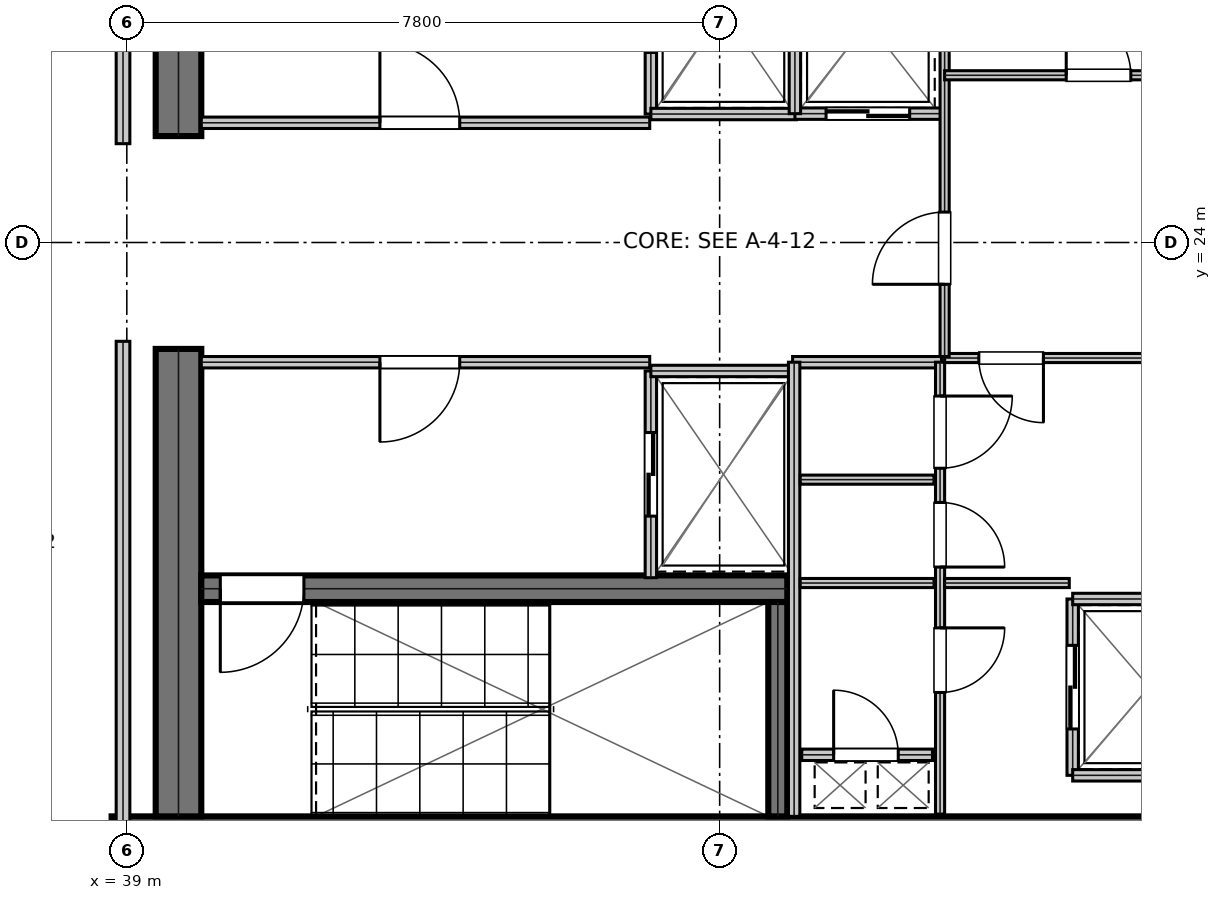
"""IFC4 building model, lengths in metres.
Left out: names, types, materials, properties, quantities, classifications, styles, units other than length and angle.
Written with IfcOpenShell. Run it as: python <this file> out.ifc"""

import sys

from ifc_helpers import new_model, si_unit, direction, frame, frame_2d, origin, place, context, subcontext, project, spatial, rectangle, extrude, element, fill, save


model = new_model("IFC4")
c1 = context("Model", 3, precision=1e-05, world=origin(), true_north=direction((0.0, 1.0)))
c2 = subcontext(c1, "Body", "Model", "MODEL_VIEW")
j1 = project(units=[si_unit("LENGTHUNIT", "METRE"), si_unit("PLANEANGLEUNIT", "RADIAN")], contexts=[c1])
p1 = place(None, origin())
s1 = spatial("IfcSite", under=j1, at=p1, CompositionType="ELEMENT")
p2 = place(p1, origin())
s2 = spatial("IfcBuilding", under=s1, at=p2, CompositionType="ELEMENT")
p3 = place(p2, frame((0.0, 0.0, 291.15)))
s3 = spatial("IfcBuildingStorey", under=s2, at=p3, CompositionType="ELEMENT", Elevation=291.15)
p4 = place(p3, frame((38.8, 16.15, 0.0), z_axis=(0.0, 0.0, 1.0), x_axis=(1.0, 0.0, 0.0)))
e1 = element("IfcWall", 1, at=p4, inside=s3, PredefinedType="SHEAR", context=c2, shape_type="SweptSolid", body=[
    extrude(rectangle(XDim=16.0, YDim=0.6, at=frame_2d((8.0, 0.0))), origin(), (0.0, 0.0, 1.0), 3.81),
])
for number, where, z_axis, x_axis in (
    (2, (39.68, 16.45, 0.0), (0.0, 0.0, 1.0), (0.0, 1.0, 0.0)),
    (3, (39.68, 25.4, 0.0), (0.0, 0.0, 1.0), (0.0, 1.0, 0.0)),
):
    element("IfcWall", number, at=place(p3, frame(where, z_axis=z_axis, x_axis=x_axis)), inside=s3, PredefinedType="SHEAR", context=c2, shape_type="SweptSolid", body=[
        extrude(rectangle(XDim=6.15, YDim=0.6, at=frame_2d((3.075, 0.0))), origin(), (0.0, 0.0, 1.0), 3.81),
    ])
p5 = place(p3, frame((39.98, 19.445, 0.0), z_axis=(0.0, 0.0, 1.0), x_axis=(1.0, 0.0, 0.0)))
e4 = element("IfcWall", 4, at=p5, inside=s3, PredefinedType="SHEAR", context=c2, shape_type="SweptSolid", body=[
    extrude(rectangle(XDim=7.71, YDim=0.35, at=frame_2d((3.855, 0.0))), origin(), (0.0, 0.0, 1.0), 3.81),
])
p6 = place(p5, frame((0.25, 0.0, 0.0)))
e5 = element("IfcOpeningElement", 5, at=p6, cuts=e4, PredefinedType="OPENING", context=c2, shape_type="SweptSolid", body=[
    extrude(rectangle(XDim=1.1, YDim=2.15, at=frame_2d((0.55, 1.075))), frame((0.0, 0.185, 0.0), z_axis=(0.0, -1.0, 0.0), x_axis=(1.0, 0.0, 0.0)), (0.0, 0.0, 1.0), 0.37),
])
p7 = place(p3, frame((47.565, 16.45, 0.0), z_axis=(0.0, 0.0, 1.0), x_axis=(0.0, 1.0, 0.0)))
e6 = element("IfcWall", 6, at=p7, inside=s3, PredefinedType="SHEAR", context=c2, shape_type="SweptSolid", body=[
    extrude(rectangle(XDim=2.82, YDim=0.25, at=frame_2d((1.41, 0.0))), origin(), (0.0, 0.0, 1.0), 3.81),
])
p8 = place(p3, frame((39.98, 25.575, 0.0), z_axis=(0.0, 0.0, 1.0), x_axis=(1.0, 0.0, 0.0)))
e7 = element("IfcWall", 7, at=p8, inside=s3, PredefinedType="PARTITIONING", context=c2, shape_type="SweptSolid", body=[
    extrude(rectangle(XDim=5.9, YDim=0.15, at=frame_2d((2.95, 0.0))), origin(), (0.0, 0.0, 1.0), 3.81),
])
p9 = place(p8, frame((2.35, 0.0, 0.0)))
e8 = element("IfcOpeningElement", 8, at=p9, cuts=e7, PredefinedType="OPENING", context=c2, shape_type="SweptSolid", body=[
    extrude(rectangle(XDim=1.05, YDim=2.15, at=frame_2d((0.525, 1.075))), frame((0.0, 0.085, 0.0), z_axis=(0.0, -1.0, 0.0), x_axis=(1.0, 0.0, 0.0)), (0.0, 0.0, 1.0), 0.17),
])
p10 = place(p3, frame((39.98, 22.425, 0.0), z_axis=(0.0, 0.0, 1.0), x_axis=(1.0, 0.0, 0.0)))
e9 = element("IfcWall", 9, at=p10, inside=s3, PredefinedType="PARTITIONING", context=c2, shape_type="SweptSolid", body=[
    extrude(rectangle(XDim=5.9, YDim=0.15, at=frame_2d((2.95, 0.0))), origin(), (0.0, 0.0, 1.0), 3.81),
])
p11 = place(p10, frame((2.35, 0.0, 0.0)))
e10 = element("IfcOpeningElement", 10, at=p11, cuts=e9, PredefinedType="OPENING", context=c2, shape_type="SweptSolid", body=[
    extrude(rectangle(XDim=1.05, YDim=2.15, at=frame_2d((0.525, 1.075))), frame((0.0, 0.085, 0.0), z_axis=(0.0, -1.0, 0.0), x_axis=(1.0, 0.0, 0.0)), (0.0, 0.0, 1.0), 0.17),
])
p12 = place(p3, frame((45.895, 25.69, 0.0), z_axis=(0.0, 0.0, 1.0), x_axis=(0.0, 1.0, 0.0)))
e11 = element("IfcWall", 11, at=p12, inside=s3, PredefinedType="PARTITIONING", context=c2, shape_type="SweptSolid", body=[
    extrude(rectangle(XDim=2.72, YDim=0.15, at=frame_2d((1.36, 0.0))), origin(), (0.0, 0.0, 1.0), 3.81),
])
p13 = place(p12, frame((0.81, 0.0, 0.0)))
e12 = element("IfcOpeningElement", 12, at=p13, cuts=e11, PredefinedType="OPENING", context=c2, shape_type="SweptSolid", body=[
    extrude(rectangle(XDim=1.1, YDim=2.15, at=frame_2d((0.55, 1.075))), frame((0.0, 0.085, 0.0), z_axis=(0.0, -1.0, 0.0), x_axis=(1.0, 0.0, 0.0)), (0.0, 0.0, 1.0), 0.17),
])
p14 = place(p3, frame((45.895, 25.69, 0.0), z_axis=(0.0, 0.0, 1.0), x_axis=(1.0, 0.0, 0.0)))
e13 = element("IfcWall", 13, at=p14, inside=s3, PredefinedType="PARTITIONING", context=c2, shape_type="SweptSolid", body=[
    extrude(rectangle(XDim=1.915, YDim=0.15, at=frame_2d((0.958, 0.0))), origin(), (0.0, 0.0, 1.0), 3.81),
])
p15 = place(p3, frame((45.895, 19.59, 0.0), z_axis=(0.0, 0.0, 1.0), x_axis=(0.0, 1.0, 0.0)))
e14 = element("IfcWall", 14, at=p15, inside=s3, PredefinedType="PARTITIONING", context=c2, shape_type="SweptSolid", body=[
    extrude(rectangle(XDim=2.72, YDim=0.15, at=frame_2d((1.36, 0.0))), origin(), (0.0, 0.0, 1.0), 3.81),
])
p16 = place(p15, frame((0.81, 0.0, 0.0)))
e15 = element("IfcOpeningElement", 15, at=p16, cuts=e14, PredefinedType="OPENING", context=c2, shape_type="SweptSolid", body=[
    extrude(rectangle(XDim=1.1, YDim=2.15, at=frame_2d((0.55, 1.075))), frame((0.0, 0.085, 0.0), z_axis=(0.0, -1.0, 0.0), x_axis=(1.0, 0.0, 0.0)), (0.0, 0.0, 1.0), 0.17),
])
p17 = place(p3, frame((45.895, 22.31, 0.0), z_axis=(0.0, 0.0, 1.0), x_axis=(1.0, 0.0, 0.0)))
e16 = element("IfcWall", 16, at=p17, inside=s3, PredefinedType="PARTITIONING", context=c2, shape_type="SweptSolid", body=[
    extrude(rectangle(XDim=1.915, YDim=0.15, at=frame_2d((0.958, 0.0))), origin(), (0.0, 0.0, 1.0), 3.81),
])
p18 = place(p3, frame((47.79, 25.695, 0.0), z_axis=(0.0, 0.0, 1.0), x_axis=(1.0, 0.0, 0.0)))
e17 = element("IfcWall", 17, at=p18, inside=s3, PredefinedType="PARTITIONING", context=c2, shape_type="SweptSolid", body=[
    extrude(rectangle(XDim=1.92, YDim=0.15, at=frame_2d((0.96, 0.0))), origin(), (0.0, 0.0, 1.0), 3.81),
])
p19 = place(p18, frame((0.41, 0.0, 0.0)))
e18 = element("IfcOpeningElement", 18, at=p19, cuts=e17, PredefinedType="OPENING", context=c2, shape_type="SweptSolid", body=[
    extrude(rectangle(XDim=1.1, YDim=2.15, at=frame_2d((0.55, 1.075))), frame((0.0, 0.085, 0.0), z_axis=(0.0, -1.0, 0.0), x_axis=(1.0, 0.0, 0.0)), (0.0, 0.0, 1.0), 0.17),
])
p20 = place(p3, frame((47.79, 25.695, 0.0), z_axis=(0.0, 0.0, 1.0), x_axis=(0.0, 1.0, 0.0)))
e19 = element("IfcWall", 19, at=p20, inside=s3, PredefinedType="PARTITIONING", context=c2, shape_type="SweptSolid", body=[
    extrude(rectangle(XDim=2.415, YDim=0.15, at=frame_2d((1.208, 0.0))), origin(), (0.0, 0.0, 1.0), 3.81),
])
p21 = place(p3, frame((51.445, 16.99, 0.0), z_axis=(0.0, 0.0, 1.0), x_axis=(0.0, 1.0, 0.0)))
e20 = element("IfcWall", 20, at=p21, inside=s3, PredefinedType="PARTITIONING", context=c2, shape_type="SweptSolid", body=[
    extrude(rectangle(XDim=2.32, YDim=0.15, at=frame_2d((1.16, 0.0))), origin(), (0.0, 0.0, 1.0), 3.81),
])
p22 = place(p21, frame((0.61, 0.0, 0.0)))
e21 = element("IfcOpeningElement", 21, at=p22, cuts=e20, PredefinedType="OPENING", context=c2, shape_type="SweptSolid", body=[
    extrude(rectangle(XDim=1.1, YDim=2.15, at=frame_2d((0.55, 1.075))), frame((0.0, 0.085, 0.0), z_axis=(0.0, -1.0, 0.0), x_axis=(1.0, 0.0, 0.0)), (0.0, 0.0, 1.0), 0.17),
])
for number, where, z_axis, x_axis in (
    (22, (51.445, 16.99, 0.0), (0.0, 0.0, 1.0), (1.0, 0.0, 0.0)),
    (23, (51.445, 19.31, 0.0), (0.0, 0.0, 1.0), (1.0, 0.0, 0.0)),
):
    element("IfcWall", number, at=place(p3, frame(where, z_axis=z_axis, x_axis=x_axis)), inside=s3, PredefinedType="PARTITIONING", context=c2, shape_type="SweptSolid", body=[
        extrude(rectangle(XDim=2.015, YDim=0.15, at=frame_2d((1.007, 0.0))), origin(), (0.0, 0.0, 1.0), 3.81),
    ])
p23 = place(p3, frame((47.88, 17.26, 0.0), z_axis=(0.0, 0.0, 1.0), x_axis=(1.0, 0.0, 0.0)))
e24 = element("IfcWall", 24, at=p23, inside=s3, PredefinedType="PARTITIONING", context=c2, shape_type="SweptSolid", body=[
    extrude(rectangle(XDim=1.72, YDim=0.15, at=frame_2d((0.86, 0.0))), origin(), (0.0, 0.0, 1.0), 3.81),
])
p24 = place(p23, frame((0.42, 0.0, 0.0)))
e25 = element("IfcOpeningElement", 25, at=p24, cuts=e24, PredefinedType="OPENING", context=c2, shape_type="SweptSolid", body=[
    extrude(rectangle(XDim=0.85, YDim=2.15, at=frame_2d((0.425, 1.075))), frame((0.0, 0.085, 0.0), z_axis=(0.0, -1.0, 0.0), x_axis=(1.0, 0.0, 0.0)), (0.0, 0.0, 1.0), 0.17),
])
p25 = place(p3, frame((47.76, 22.425, 0.0), z_axis=(0.0, 0.0, 1.0), x_axis=(1.0, 0.0, 0.0)))
e26 = element("IfcWall", 26, at=p25, inside=s3, PredefinedType="PARTITIONING", context=c2, shape_type="SweptSolid", body=[
    extrude(rectangle(XDim=1.96, YDim=0.15, at=frame_2d((0.98, 0.0))), origin(), (0.0, 0.0, 1.0), 3.81),
])
p26 = place(p3, frame((47.78, 16.45, 0.0), z_axis=(0.0, 0.0, 1.0), x_axis=(0.0, 1.0, 0.0)))
e27 = element("IfcWall", 27, at=p26, inside=s3, PredefinedType="PARTITIONING", context=c2, shape_type="SweptSolid", body=[
    extrude(rectangle(XDim=5.975, YDim=0.15, at=frame_2d((2.988, 0.0))), origin(), (0.0, 0.0, 1.0), 3.81),
])
for number, where, z_axis, x_axis in (
    (28, (47.86, 19.52, 0.0), (0.0, 0.0, 1.0), (1.0, 0.0, 0.0)),
    (29, (47.86, 20.88, 0.0), (0.0, 0.0, 1.0), (1.0, 0.0, 0.0)),
):
    element("IfcWall", number, at=place(p3, frame(where, z_axis=z_axis, x_axis=x_axis)), inside=s3, PredefinedType="PARTITIONING", context=c2, shape_type="SweptSolid", body=[
        extrude(rectangle(XDim=1.76, YDim=0.12, at=frame_2d((0.88, 0.0))), origin(), (0.0, 0.0, 1.0), 3.81),
    ])
p27 = place(p3, frame((49.7, 16.48, 0.0), z_axis=(0.0, 0.0, 1.0), x_axis=(0.0, 1.0, 0.0)))
e30 = element("IfcWall", 30, at=p27, inside=s3, PredefinedType="PARTITIONING", context=c2, shape_type="SweptSolid", body=[
    extrude(rectangle(XDim=5.945, YDim=0.12, at=frame_2d((2.973, 0.0))), origin(), (0.0, 0.0, 1.0), 3.81),
])
p28 = place(p27, frame((1.6, 0.0, 0.0)))
e31 = element("IfcOpeningElement", 31, at=p28, cuts=e30, PredefinedType="OPENING", context=c2, shape_type="SweptSolid", body=[
    extrude(rectangle(XDim=0.85, YDim=2.15, at=frame_2d((0.425, 1.075))), frame((0.0, 0.07, 0.0), z_axis=(0.0, -1.0, 0.0), x_axis=(1.0, 0.0, 0.0)), (0.0, 0.0, 1.0), 0.14),
])
p29 = place(p27, frame((3.25, 0.0, 0.0)))
e32 = element("IfcOpeningElement", 32, at=p29, cuts=e30, PredefinedType="OPENING", context=c2, shape_type="SweptSolid", body=[
    extrude(rectangle(XDim=0.85, YDim=2.15, at=frame_2d((0.425, 1.075))), frame((0.0, 0.07, 0.0), z_axis=(0.0, -1.0, 0.0), x_axis=(1.0, 0.0, 0.0)), (0.0, 0.0, 1.0), 0.14),
])
p30 = place(p27, frame((4.55, 0.0, 0.0)))
e33 = element("IfcOpeningElement", 33, at=p30, cuts=e30, PredefinedType="OPENING", context=c2, shape_type="SweptSolid", body=[
    extrude(rectangle(XDim=0.95, YDim=2.15, at=frame_2d((0.475, 1.075))), frame((0.0, 0.07, 0.0), z_axis=(0.0, -1.0, 0.0), x_axis=(1.0, 0.0, 0.0)), (0.0, 0.0, 1.0), 0.14),
])
p31 = place(p3, frame((49.76, 22.48, 0.0), z_axis=(0.0, 0.0, 1.0), x_axis=(1.0, 0.0, 0.0)))
e34 = element("IfcWall", 34, at=p31, inside=s3, PredefinedType="PARTITIONING", context=c2, shape_type="SweptSolid", body=[
    extrude(rectangle(XDim=3.9, YDim=0.12, at=frame_2d((1.95, 0.0))), origin(), (0.0, 0.0, 1.0), 3.81),
])
p32 = place(p31, frame((0.45, 0.0, 0.0)))
e35 = element("IfcOpeningElement", 35, at=p32, cuts=e34, PredefinedType="OPENING", context=c2, shape_type="SweptSolid", body=[
    extrude(rectangle(XDim=0.85, YDim=2.15, at=frame_2d((0.425, 1.075))), frame((0.0, 0.07, 0.0), z_axis=(0.0, -1.0, 0.0), x_axis=(1.0, 0.0, 0.0)), (0.0, 0.0, 1.0), 0.14),
])
p33 = place(p3, frame((49.76, 19.52, 0.0), z_axis=(0.0, 0.0, 1.0), x_axis=(1.0, 0.0, 0.0)))
e36 = element("IfcWall", 36, at=p33, inside=s3, PredefinedType="PARTITIONING", context=c2, shape_type="SweptSolid", body=[
    extrude(rectangle(XDim=1.64, YDim=0.12, at=frame_2d((0.82, 0.0))), origin(), (0.0, 0.0, 1.0), 3.81),
])
p34 = place(p3, frame((49.76, 22.5, 0.0), z_axis=(0.0, 0.0, 1.0), x_axis=(0.0, 1.0, 0.0)))
e37 = element("IfcWall", 37, at=p34, inside=s3, PredefinedType="PARTITIONING", context=c2, shape_type="SweptSolid", body=[
    extrude(rectangle(XDim=5.72, YDim=0.12, at=frame_2d((2.86, 0.0))), origin(), (0.0, 0.0, 1.0), 3.81),
])
p35 = place(p34, frame((0.95, 0.0, 0.0)))
e38 = element("IfcOpeningElement", 38, at=p35, cuts=e37, PredefinedType="OPENING", context=c2, shape_type="SweptSolid", body=[
    extrude(rectangle(XDim=0.95, YDim=2.15, at=frame_2d((0.475, 1.075))), frame((0.0, 0.07, 0.0), z_axis=(0.0, -1.0, 0.0), x_axis=(1.0, 0.0, 0.0)), (0.0, 0.0, 1.0), 0.14),
])
p36 = place(p3, frame((49.76, 26.2, 0.0), z_axis=(0.0, 0.0, 1.0), x_axis=(1.0, 0.0, 0.0)))
e39 = element("IfcWall", 39, at=p36, inside=s3, PredefinedType="PARTITIONING", context=c2, shape_type="SweptSolid", body=[
    extrude(rectangle(XDim=3.9, YDim=0.12, at=frame_2d((1.95, 0.0))), origin(), (0.0, 0.0, 1.0), 3.81),
])
p37 = place(p36, frame((1.6, 0.0, 0.0)))
e40 = element("IfcOpeningElement", 40, at=p37, cuts=e39, PredefinedType="OPENING", context=c2, shape_type="SweptSolid", body=[
    extrude(rectangle(XDim=0.85, YDim=2.15, at=frame_2d((0.425, 1.075))), frame((0.0, 0.07, 0.0), z_axis=(0.0, -1.0, 0.0), x_axis=(1.0, 0.0, 0.0)), (0.0, 0.0, 1.0), 0.14),
])
for number, where, z_axis, x_axis in (
    (41, (38.95, 15.739, 0.0), (0.0, 0.0, 1.0), (0.0, 1.0, 0.0)),
    (42, (38.95, 25.3, 0.0), (0.0, 0.0, 1.0), (0.0, 1.0, 0.0)),
):
    element("IfcWall", number, at=place(p3, frame(where, z_axis=z_axis, x_axis=x_axis)), inside=s3, PredefinedType="SOLIDWALL", context=c2, shape_type="SweptSolid", body=[
        extrude(rectangle(XDim=6.961, YDim=0.18, at=frame_2d((3.48, 0.0))), origin(), (0.0, 0.0, 1.0), 3.27),
    ])
p38 = place(p9, origin())
e43 = element("IfcDoor", 43, at=p38, inside=s3, OperationType="SINGLE_SWING_LEFT", PredefinedType="DOOR", context=c2, shape_type="SweptSolid", body=[
    extrude(rectangle(XDim=1.05, YDim=2.15, at=frame_2d((0.525, 1.075))), frame((0.0, 0.025, 0.0), z_axis=(0.0, -1.0, 0.0), x_axis=(1.0, 0.0, 0.0)), (0.0, 0.0, 1.0), 0.05),
])
fill(e8, e43)
p39 = place(p11, frame((1.05, 0.0, 0.0), z_axis=(0.0, 0.0, 1.0), x_axis=(-1.0, 0.0, 0.0)))
e44 = element("IfcDoor", 44, at=p39, inside=s3, OperationType="SINGLE_SWING_RIGHT", PredefinedType="DOOR", context=c2, shape_type="SweptSolid", body=[
    extrude(rectangle(XDim=1.05, YDim=2.15, at=frame_2d((0.525, 1.075))), frame((0.0, 0.025, 0.0), z_axis=(0.0, -1.0, 0.0), x_axis=(1.0, 0.0, 0.0)), (0.0, 0.0, 1.0), 0.05),
])
fill(e10, e44)
p40 = place(p16, frame((1.1, 0.0, 0.0), z_axis=(0.0, 0.0, 1.0), x_axis=(-1.0, 0.0, 0.0)))
e45 = element("IfcDoor", 45, at=p40, inside=s3, OperationType="DOUBLE_DOOR_SLIDING", PredefinedType="DOOR", context=c2, shape_type="SweptSolid", body=[
    extrude(rectangle(XDim=1.1, YDim=2.15, at=frame_2d((0.55, 1.075))), frame((0.0, 0.025, 0.0), z_axis=(0.0, -1.0, 0.0), x_axis=(1.0, 0.0, 0.0)), (0.0, 0.0, 1.0), 0.05),
])
fill(e15, e45)
p41 = place(p19, frame((1.1, 0.0, 0.0), z_axis=(0.0, 0.0, 1.0), x_axis=(-1.0, 0.0, 0.0)))
e46 = element("IfcDoor", 46, at=p41, inside=s3, OperationType="DOUBLE_DOOR_SLIDING", PredefinedType="DOOR", context=c2, shape_type="SweptSolid", body=[
    extrude(rectangle(XDim=1.1, YDim=2.15, at=frame_2d((0.55, 1.075))), frame((0.0, 0.025, 0.0), z_axis=(0.0, -1.0, 0.0), x_axis=(1.0, 0.0, 0.0)), (0.0, 0.0, 1.0), 0.05),
])
fill(e18, e46)
p42 = place(p22, frame((1.1, 0.0, 0.0), z_axis=(0.0, 0.0, 1.0), x_axis=(-1.0, 0.0, 0.0)))
e47 = element("IfcDoor", 47, at=p42, inside=s3, OperationType="DOUBLE_DOOR_SLIDING", PredefinedType="DOOR", context=c2, shape_type="SweptSolid", body=[
    extrude(rectangle(XDim=1.1, YDim=2.15, at=frame_2d((0.55, 1.075))), frame((0.0, 0.025, 0.0), z_axis=(0.0, -1.0, 0.0), x_axis=(1.0, 0.0, 0.0)), (0.0, 0.0, 1.0), 0.05),
])
fill(e21, e47)
p43 = place(p24, origin())
e48 = element("IfcDoor", 48, at=p43, inside=s3, OperationType="SINGLE_SWING_LEFT", PredefinedType="TRAPDOOR", context=c2, shape_type="SweptSolid", body=[
    extrude(rectangle(XDim=0.85, YDim=2.15, at=frame_2d((0.425, 1.075))), frame((0.0, 0.025, 0.0), z_axis=(0.0, -1.0, 0.0), x_axis=(1.0, 0.0, 0.0)), (0.0, 0.0, 1.0), 0.05),
])
fill(e25, e48)
p44 = place(p28, frame((0.85, 0.0, 0.0), z_axis=(0.0, 0.0, 1.0), x_axis=(-1.0, 0.0, 0.0)))
e49 = element("IfcDoor", 49, at=p44, inside=s3, OperationType="SINGLE_SWING_LEFT", PredefinedType="DOOR", context=c2, shape_type="SweptSolid", body=[
    extrude(rectangle(XDim=0.85, YDim=2.15, at=frame_2d((0.425, 1.075))), frame((0.0, 0.025, 0.0), z_axis=(0.0, -1.0, 0.0), x_axis=(1.0, 0.0, 0.0)), (0.0, 0.0, 1.0), 0.05),
])
fill(e31, e49)
p45 = place(p29, frame((0.85, 0.0, 0.0), z_axis=(0.0, 0.0, 1.0), x_axis=(-1.0, 0.0, 0.0)))
e50 = element("IfcDoor", 50, at=p45, inside=s3, OperationType="SINGLE_SWING_RIGHT", PredefinedType="DOOR", context=c2, shape_type="SweptSolid", body=[
    extrude(rectangle(XDim=0.85, YDim=2.15, at=frame_2d((0.425, 1.075))), frame((0.0, 0.025, 0.0), z_axis=(0.0, -1.0, 0.0), x_axis=(1.0, 0.0, 0.0)), (0.0, 0.0, 1.0), 0.05),
])
fill(e32, e50)
p46 = place(p30, frame((0.95, 0.0, 0.0), z_axis=(0.0, 0.0, 1.0), x_axis=(-1.0, 0.0, 0.0)))
e51 = element("IfcDoor", 51, at=p46, inside=s3, OperationType="SINGLE_SWING_LEFT", PredefinedType="DOOR", context=c2, shape_type="SweptSolid", body=[
    extrude(rectangle(XDim=0.95, YDim=2.15, at=frame_2d((0.475, 1.075))), frame((0.0, 0.025, 0.0), z_axis=(0.0, -1.0, 0.0), x_axis=(1.0, 0.0, 0.0)), (0.0, 0.0, 1.0), 0.05),
])
fill(e33, e51)
p47 = place(p32, frame((0.85, 0.0, 0.0), z_axis=(0.0, 0.0, 1.0), x_axis=(-1.0, 0.0, 0.0)))
e52 = element("IfcDoor", 52, at=p47, inside=s3, OperationType="SINGLE_SWING_LEFT", PredefinedType="DOOR", context=c2, shape_type="SweptSolid", body=[
    extrude(rectangle(XDim=0.85, YDim=2.15, at=frame_2d((0.425, 1.075))), frame((0.0, 0.025, 0.0), z_axis=(0.0, -1.0, 0.0), x_axis=(1.0, 0.0, 0.0)), (0.0, 0.0, 1.0), 0.05),
])
fill(e35, e52)
p48 = place(p35, origin())
e53 = element("IfcDoor", 53, at=p48, inside=s3, OperationType="SINGLE_SWING_LEFT", PredefinedType="DOOR", context=c2, shape_type="SweptSolid", body=[
    extrude(rectangle(XDim=0.95, YDim=2.15, at=frame_2d((0.475, 1.075))), frame((0.0, 0.025, 0.0), z_axis=(0.0, -1.0, 0.0), x_axis=(1.0, 0.0, 0.0)), (0.0, 0.0, 1.0), 0.05),
])
fill(e38, e53)
p49 = place(p37, origin())
e54 = element("IfcDoor", 54, at=p49, inside=s3, OperationType="SINGLE_SWING_LEFT", PredefinedType="DOOR", context=c2, shape_type="SweptSolid", body=[
    extrude(rectangle(XDim=0.85, YDim=2.15, at=frame_2d((0.425, 1.075))), frame((0.0, 0.025, 0.0), z_axis=(0.0, -1.0, 0.0), x_axis=(1.0, 0.0, 0.0)), (0.0, 0.0, 1.0), 0.05),
])
fill(e40, e54)
p50 = place(p6, frame((1.1, 0.0, 0.0), z_axis=(0.0, 0.0, 1.0), x_axis=(-1.0, 0.0, 0.0)))
e55 = element("IfcDoor", 55, at=p50, inside=s3, OperationType="SINGLE_SWING_RIGHT", PredefinedType="DOOR", context=c2, shape_type="SweptSolid", body=[
    extrude(rectangle(XDim=1.1, YDim=2.15, at=frame_2d((0.55, 1.075))), frame((0.0, 0.025, 0.0), z_axis=(0.0, -1.0, 0.0), x_axis=(1.0, 0.0, 0.0)), (0.0, 0.0, 1.0), 0.05),
])
fill(e5, e55)
save(model, sys.argv[1])
